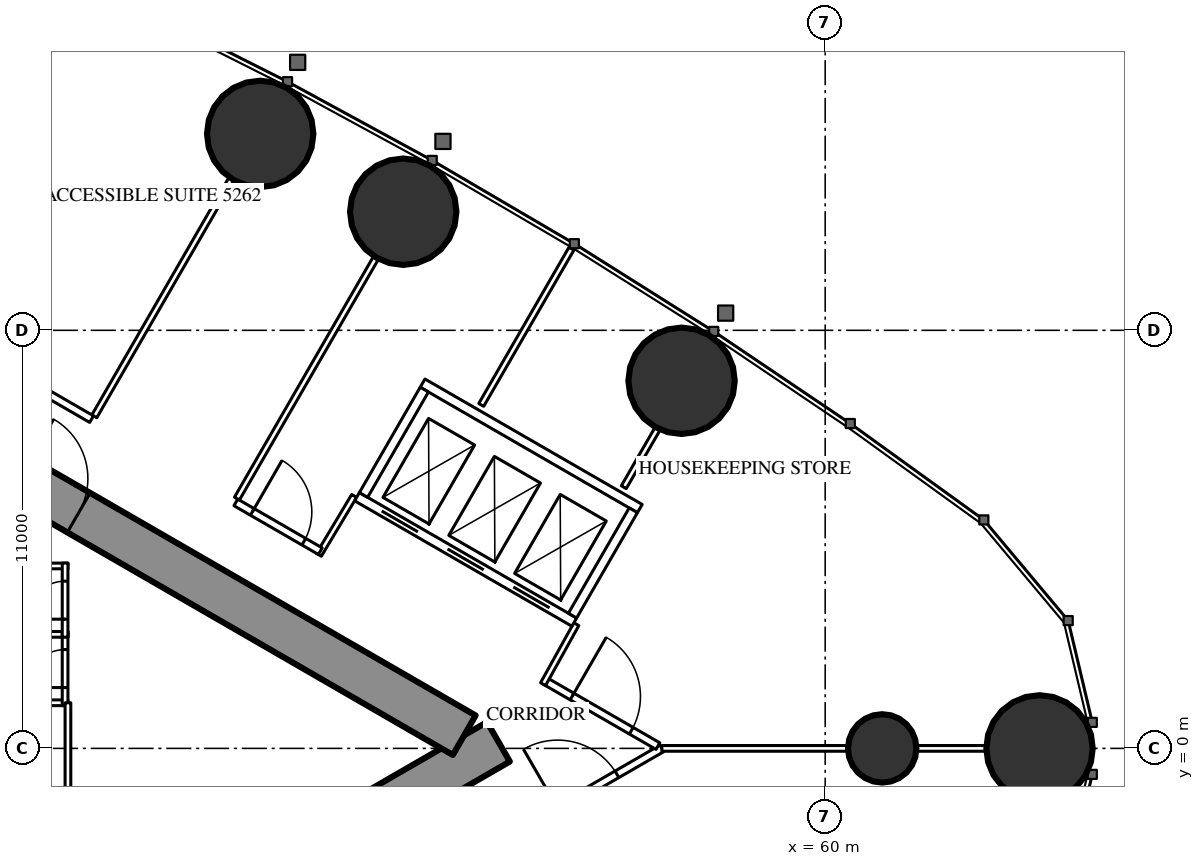
"""IFC4 building model, lengths in metres.
Left out: names, types, materials, properties, quantities, classifications, styles, units other than length and angle.
Written with IfcOpenShell. Run it as: python <this file> out.ifc"""

import sys

from ifc_helpers import new_model, si_unit, direction, frame, frame_2d, origin, origin_2d, place, context, subcontext, project, spatial, rectangle, circle, extrude, element, fill, save


model = new_model("IFC4")
c1 = context("Model", 3, precision=1e-05, world=origin(), true_north=direction((0.0, 1.0)))
c2 = subcontext(c1, "Body", "Model", "MODEL_VIEW")
j1 = project(units=[si_unit("LENGTHUNIT", "METRE"), si_unit("PLANEANGLEUNIT", "RADIAN")], contexts=[c1])
p1 = place(None, origin())
s1 = spatial("IfcSite", under=j1, at=p1, CompositionType="ELEMENT")
p2 = place(p1, origin())
s2 = spatial("IfcBuilding", under=s1, at=p2, CompositionType="ELEMENT")
p3 = place(p2, frame((0.0, 0.0, 194.8)))
s3 = spatial("IfcBuildingStorey", under=s2, at=p3, CompositionType="ELEMENT", Elevation=194.8)
for number, where, z_axis, x_axis in (
    (1, (65.64, 0.0, 0.0), (0.0, 0.0, 1.0), (1.0, 0.0, 0.0)),
    (2, (56.221, 9.672, 0.0), (0.0, 0.0, 1.0), (1.0, 0.0, 0.0)),
    (3, (48.897, 14.121, 0.0), (0.0, 0.0, 1.0), (1.0, 0.0, 0.0)),
    (4, (45.134, 16.168, 0.0), (0.0, 0.0, 1.0), (1.0, 0.0, 0.0)),
):
    element("IfcColumn", number, at=place(p3, frame(where, z_axis=z_axis, x_axis=x_axis)), inside=s3, PredefinedType="COLUMN", context=c2, shape_type="SweptSolid", body=[
        extrude(circle(Radius=1.4, at=origin_2d()), origin(), (0.0, 0.0, 1.0), 3.5),
    ])
p4 = place(p3, frame((61.5, 0.0, 0.0), z_axis=(0.0, 0.0, 1.0), x_axis=(1.0, 0.0, 0.0)))
e5 = element("IfcColumn", 5, at=p4, inside=s3, PredefinedType="COLUMN", context=c2, shape_type="SweptSolid", body=[
    extrude(circle(Radius=0.9, at=origin_2d()), origin(), (0.0, 0.0, 1.0), 3.5),
])
p5 = place(p3, frame((27.2, -13.8, 0.0), z_axis=(0.0, 0.0, 1.0), x_axis=(0.866027159892, 0.499996958321, 0.0)))
e6 = element("IfcWall", 6, at=p5, inside=s3, PredefinedType="SHEAR", context=c2, shape_type="SweptSolid", body=[
    extrude(rectangle(XDim=27.947, YDim=1.2, at=frame_2d((13.973, 0.0))), origin(), (0.0, 0.0, 1.0), 3.5),
])
p6 = place(p5, frame((4.6, 0.0, 0.0)))
e7 = element("IfcOpeningElement", 7, at=p6, cuts=e6, PredefinedType="OPENING", context=c2, shape_type="SweptSolid", body=[
    extrude(rectangle(XDim=1.0, YDim=2.2, at=frame_2d((0.5, 1.1))), frame((0.0, 0.61, 0.0), z_axis=(0.0, -1.0, 0.0), x_axis=(1.0, 0.0, 0.0)), (0.0, 0.0, 1.0), 1.22),
])
p7 = place(p5, frame((13.395, 0.0, 0.0)))
e8 = element("IfcOpeningElement", 8, at=p7, cuts=e6, PredefinedType="OPENING", context=c2, shape_type="SweptSolid", body=[
    extrude(rectangle(XDim=1.8, YDim=2.2, at=frame_2d((0.9, 1.1))), frame((0.0, 0.61, 0.0), z_axis=(0.0, -1.0, 0.0), x_axis=(1.0, 0.0, 0.0)), (0.0, 0.0, 1.0), 1.22),
])
p8 = place(p3, frame((27.2, 13.8, 0.0), z_axis=(0.0, 0.0, 1.0), x_axis=(0.866024515034, -0.500001539357, 0.0)))
e9 = element("IfcWall", 9, at=p8, inside=s3, PredefinedType="SHEAR", context=c2, shape_type="SweptSolid", body=[
    extrude(rectangle(XDim=26.907, YDim=1.2, at=frame_2d((13.454, 0.0))), origin(), (0.0, 0.0, 1.0), 3.5),
])
p9 = place(p8, frame((4.6, 0.0, 0.0)))
e10 = element("IfcOpeningElement", 10, at=p9, cuts=e9, PredefinedType="OPENING", context=c2, shape_type="SweptSolid", body=[
    extrude(rectangle(XDim=1.0, YDim=2.2, at=frame_2d((0.5, 1.1))), frame((0.0, 0.61, 0.0), z_axis=(0.0, -1.0, 0.0), x_axis=(1.0, 0.0, 0.0)), (0.0, 0.0, 1.0), 1.22),
])
p10 = place(p8, frame((13.395, 0.0, 0.0)))
e11 = element("IfcOpeningElement", 11, at=p10, cuts=e9, PredefinedType="OPENING", context=c2, shape_type="SweptSolid", body=[
    extrude(rectangle(XDim=1.8, YDim=2.2, at=frame_2d((0.9, 1.1))), frame((0.0, 0.61, 0.0), z_axis=(0.0, -1.0, 0.0), x_axis=(1.0, 0.0, 0.0)), (0.0, 0.0, 1.0), 1.22),
])
p11 = place(p3, frame((27.959, -16.017, 0.0), z_axis=(0.0, 0.0, 1.0), x_axis=(0.866024151371, 0.500002169237, 0.0)))
e12 = element("IfcWall", 12, at=p11, inside=s3, PredefinedType="PARTITIONING", context=c2, shape_type="SweptSolid", body=[
    extrude(rectangle(XDim=32.034, YDim=0.2, at=frame_2d((16.017, 0.0))), origin(), (0.0, 0.0, 1.0), 3.25),
])
p12 = place(p11, frame((0.6, 0.0, 0.0)))
e13 = element("IfcOpeningElement", 13, at=p12, cuts=e12, PredefinedType="OPENING", context=c2, shape_type="SweptSolid", body=[
    extrude(rectangle(XDim=0.95, YDim=2.2, at=frame_2d((0.475, 1.1))), frame((0.0, 0.11, 0.0), z_axis=(0.0, -1.0, 0.0), x_axis=(1.0, 0.0, 0.0)), (0.0, 0.0, 1.0), 0.22),
])
p13 = place(p11, frame((13.132, 0.0, 0.0)))
e14 = element("IfcOpeningElement", 14, at=p13, cuts=e12, PredefinedType="OPENING", context=c2, shape_type="SweptSolid", body=[
    extrude(rectangle(XDim=0.95, YDim=2.2, at=frame_2d((0.475, 1.1))), frame((0.0, 0.11, 0.0), z_axis=(0.0, -1.0, 0.0), x_axis=(1.0, 0.0, 0.0)), (0.0, 0.0, 1.0), 0.22),
])
p14 = place(p11, frame((15.391, 0.0, 0.0)))
e15 = element("IfcOpeningElement", 15, at=p14, cuts=e12, PredefinedType="OPENING", context=c2, shape_type="SweptSolid", body=[
    extrude(rectangle(XDim=0.95, YDim=2.2, at=frame_2d((0.475, 1.1))), frame((0.0, 0.11, 0.0), z_axis=(0.0, -1.0, 0.0), x_axis=(1.0, 0.0, 0.0)), (0.0, 0.0, 1.0), 0.22),
])
p15 = place(p11, frame((19.441, 0.0, 0.0)))
e16 = element("IfcOpeningElement", 16, at=p15, cuts=e12, PredefinedType="OPENING", context=c2, shape_type="SweptSolid", body=[
    extrude(rectangle(XDim=0.95, YDim=2.2, at=frame_2d((0.475, 1.1))), frame((0.0, 0.11, 0.0), z_axis=(0.0, -1.0, 0.0), x_axis=(1.0, 0.0, 0.0)), (0.0, 0.0, 1.0), 0.22),
])
p16 = place(p11, frame((26.406, 0.0, 0.0)))
e17 = element("IfcOpeningElement", 17, at=p16, cuts=e12, PredefinedType="OPENING", context=c2, shape_type="SweptSolid", body=[
    extrude(rectangle(XDim=0.95, YDim=2.2, at=frame_2d((0.475, 1.1))), frame((0.0, 0.11, 0.0), z_axis=(0.0, -1.0, 0.0), x_axis=(1.0, 0.0, 0.0)), (0.0, 0.0, 1.0), 0.22),
])
p17 = place(p11, frame((28.87, 0.0, 0.0)))
e18 = element("IfcOpeningElement", 18, at=p17, cuts=e12, PredefinedType="OPENING", context=c2, shape_type="SweptSolid", body=[
    extrude(rectangle(XDim=1.8, YDim=2.2, at=frame_2d((0.9, 1.1))), frame((0.0, 0.11, 0.0), z_axis=(0.0, -1.0, 0.0), x_axis=(1.0, 0.0, 0.0)), (0.0, 0.0, 1.0), 0.22),
])
p18 = place(p3, frame((40.769, 8.737, 0.0), z_axis=(0.0, 0.0, 1.0), x_axis=(0.500013115284, 0.866017831539, 0.0)))
e19 = element("IfcWall", 19, at=p18, inside=s3, PredefinedType="PARTITIONING", context=c2, shape_type="SweptSolid", body=[
    extrude(rectangle(XDim=7.198, YDim=0.15, at=frame_2d((3.599, 0.0))), origin(), (0.0, 0.0, 1.0), 2.3),
])
p19 = place(p3, frame((44.521, 6.571, 0.0), z_axis=(0.0, 0.0, 1.0), x_axis=(0.500020376429, 0.866013639128, 0.0)))
e20 = element("IfcWall", 20, at=p19, inside=s3, PredefinedType="PARTITIONING", context=c2, shape_type="SweptSolid", body=[
    extrude(rectangle(XDim=7.306, YDim=0.15, at=frame_2d((3.653, 0.0))), origin(), (0.0, 0.0, 1.0), 2.3),
])
p20 = place(p3, frame((55.702, 0.0, 0.0), z_axis=(0.0, 0.0, 1.0), x_axis=(1.0, 0.0, 0.0)))
e21 = element("IfcWall", 21, at=p20, inside=s3, PredefinedType="PARTITIONING", context=c2, shape_type="SweptSolid", body=[
    extrude(rectangle(XDim=8.518, YDim=0.15, at=frame_2d((4.259, 0.0))), origin(), (0.0, 0.0, 1.0), 2.3),
])
p21 = place(p3, frame((50.95, 9.037, 0.0), z_axis=(0.0, 0.0, 1.0), x_axis=(0.499988022762, 0.866032318735, 0.0)))
e22 = element("IfcWall", 22, at=p21, inside=s3, PredefinedType="PARTITIONING", context=c2, shape_type="SweptSolid", body=[
    extrude(rectangle(XDim=4.748, YDim=0.15, at=frame_2d((2.374, 0.0))), origin(), (0.0, 0.0, 1.0), 3.25),
])
p22 = place(p3, frame((54.7, 6.872, 0.0), z_axis=(0.0, 0.0, 1.0), x_axis=(0.499989690894, 0.866031355668, 0.0)))
e23 = element("IfcWall", 23, at=p22, inside=s3, PredefinedType="PARTITIONING", context=c2, shape_type="SweptSolid", body=[
    extrude(rectangle(XDim=1.766, YDim=0.15, at=frame_2d((0.883, 0.0))), origin(), (0.0, 0.0, 1.0), 3.25),
])
p23 = place(p3, frame((52.639, 1.769, 0.0), z_axis=(0.0, 0.0, 1.0), x_axis=(0.866027340901, -0.4999966448, 0.0)))
e24 = element("IfcWall", 24, at=p23, inside=s3, PredefinedType="PARTITIONING", context=c2, shape_type="SweptSolid", body=[
    extrude(rectangle(XDim=3.417, YDim=0.2, at=frame_2d((1.708, 0.0))), origin(), (0.0, 0.0, 1.0), 3.25),
])
p24 = place(p23, frame((0.809, 0.0, 0.0)))
e25 = element("IfcOpeningElement", 25, at=p24, cuts=e24, PredefinedType="OPENING", context=c2, shape_type="SweptSolid", body=[
    extrude(rectangle(XDim=1.8, YDim=2.2, at=frame_2d((0.9, 1.1))), frame((0.0, 0.11, 0.0), z_axis=(0.0, -1.0, 0.0), x_axis=(1.0, 0.0, 0.0)), (0.0, 0.0, 1.0), 0.22),
])
for number, where, z_axis, x_axis in (
    (26, (52.576, 1.689, 0.0), (0.0, 0.0, 1.0), (0.485, 0.874, 0.0)),
    (27, (47.606, 6.643, 0.0), (0.0, 0.0, 1.0), (-0.514, -0.858, 0.0)),
):
    element("IfcWall", number, at=place(p3, frame(where, z_axis=z_axis, x_axis=x_axis)), inside=s3, PredefinedType="PARTITIONING", context=c2, shape_type="SweptSolid", body=[
        extrude(rectangle(XDim=1.805, YDim=0.15, at=frame_2d((0.902, 0.0))), origin(), (0.0, 0.0, 1.0), 3.25),
    ])
p25 = place(p3, frame((27.959, 16.017, 0.0), z_axis=(0.0, 0.0, 1.0), x_axis=(0.866024165033, -0.500002145574, 0.0)))
e28 = element("IfcWall", 28, at=p25, inside=s3, PredefinedType="PARTITIONING", context=c2, shape_type="SweptSolid", body=[
    extrude(rectangle(XDim=14.709, YDim=0.2, at=frame_2d((7.354, 0.0))), origin(), (0.0, 0.0, 1.0), 3.25),
])
p26 = place(p25, frame((9.215, 0.0, 0.0)))
e29 = element("IfcOpeningElement", 29, at=p26, cuts=e28, PredefinedType="OPENING", context=c2, shape_type="SweptSolid", body=[
    extrude(rectangle(XDim=1.0, YDim=2.2, at=frame_2d((0.5, 1.1))), frame((0.0, 0.11, 0.0), z_axis=(0.0, -1.0, 0.0), x_axis=(1.0, 0.0, 0.0)), (0.0, 0.0, 1.0), 0.22),
])
p27 = place(p25, frame((4.765, 0.0, 0.0)))
e30 = element("IfcOpeningElement", 30, at=p27, cuts=e28, PredefinedType="OPENING", context=c2, shape_type="SweptSolid", body=[
    extrude(rectangle(XDim=0.95, YDim=2.2, at=frame_2d((0.475, 1.1))), frame((0.0, 0.11, 0.0), z_axis=(0.0, -1.0, 0.0), x_axis=(1.0, 0.0, 0.0)), (0.0, 0.0, 1.0), 0.22),
])
p28 = place(p3, frame((44.493, 6.472, 0.0), z_axis=(0.0, 0.0, 1.0), x_axis=(0.866027140358, -0.499996992154, 0.0)))
e31 = element("IfcWall", 31, at=p28, inside=s3, PredefinedType="PARTITIONING", context=c2, shape_type="SweptSolid", body=[
    extrude(rectangle(XDim=2.566, YDim=0.2, at=frame_2d((1.283, 0.0))), origin(), (0.0, 0.0, 1.0), 3.25),
])
p29 = place(p28, frame((0.5, 0.0, 0.0)))
e32 = element("IfcOpeningElement", 32, at=p29, cuts=e31, PredefinedType="OPENING", context=c2, shape_type="SweptSolid", body=[
    extrude(rectangle(XDim=1.566, YDim=2.2, at=frame_2d((0.783, 1.1))), frame((0.0, 0.11, 0.0), z_axis=(0.0, -1.0, 0.0), x_axis=(1.0, 0.0, 0.0)), (0.0, 0.0, 1.0), 0.22),
])
for number, where, z_axis, x_axis in (
    (33, (37.9, 1.2, 0.0), (0.0, 0.0, 1.0), (1.0, 0.0, 0.0)),
    (34, (37.9, 3.0, 0.0), (0.0, 0.0, 1.0), (1.0, 0.0, 0.0)),
    (35, (37.9, 4.8, 0.0), (0.0, 0.0, 1.0), (1.0, 0.0, 0.0)),
):
    element("IfcWall", number, at=place(p3, frame(where, z_axis=z_axis, x_axis=x_axis)), inside=s3, PredefinedType="PARTITIONING", context=c2, shape_type="SweptSolid", body=[
        extrude(rectangle(XDim=2.175, YDim=0.15, at=frame_2d((1.087, 0.0))), origin(), (0.0, 0.0, 1.0), 3.25),
    ])
p30 = place(p3, frame((40.0, 1.125, 0.0), z_axis=(0.0, 0.0, 1.0), x_axis=(0.0, 1.0, 0.0)))
e36 = element("IfcWall", 36, at=p30, inside=s3, PredefinedType="PARTITIONING", context=c2, shape_type="SweptSolid", body=[
    extrude(rectangle(XDim=1.95, YDim=0.15, at=frame_2d((0.975, 0.0))), origin(), (0.0, 0.0, 1.0), 3.25),
])
p31 = place(p30, frame((0.475, 0.0, 0.0)))
e37 = element("IfcOpeningElement", 37, at=p31, cuts=e36, PredefinedType="OPENING", context=c2, shape_type="SweptSolid", body=[
    extrude(rectangle(XDim=1.0, YDim=2.2, at=frame_2d((0.5, 1.1))), frame((0.0, 0.085, 0.0), z_axis=(0.0, -1.0, 0.0), x_axis=(1.0, 0.0, 0.0)), (0.0, 0.0, 1.0), 0.17),
])
p32 = place(p3, frame((40.0, 2.925, 0.0), z_axis=(0.0, 0.0, 1.0), x_axis=(0.0, 1.0, 0.0)))
e38 = element("IfcWall", 38, at=p32, inside=s3, PredefinedType="PARTITIONING", context=c2, shape_type="SweptSolid", body=[
    extrude(rectangle(XDim=1.95, YDim=0.15, at=frame_2d((0.975, 0.0))), origin(), (0.0, 0.0, 1.0), 3.25),
])
p33 = place(p32, frame((0.475, 0.0, 0.0)))
e39 = element("IfcOpeningElement", 39, at=p33, cuts=e38, PredefinedType="OPENING", context=c2, shape_type="SweptSolid", body=[
    extrude(rectangle(XDim=1.0, YDim=2.2, at=frame_2d((0.5, 1.1))), frame((0.0, 0.085, 0.0), z_axis=(0.0, -1.0, 0.0), x_axis=(1.0, 0.0, 0.0)), (0.0, 0.0, 1.0), 0.17),
])
p34 = place(p3, frame((40.075, -5.674, 0.0), z_axis=(0.0, 0.0, 1.0), x_axis=(0.0, 1.0, 0.0)))
e40 = element("IfcWall", 40, at=p34, inside=s3, PredefinedType="PARTITIONING", context=c2, shape_type="SweptSolid", body=[
    extrude(rectangle(XDim=6.874, YDim=0.15, at=frame_2d((3.437, 0.0))), origin(), (0.0, 0.0, 1.0), 3.25),
])
p35 = place(p34, frame((2.537, 0.0, 0.0)))
e41 = element("IfcOpeningElement", 41, at=p35, cuts=e40, PredefinedType="OPENING", context=c2, shape_type="SweptSolid", body=[
    extrude(rectangle(XDim=1.8, YDim=2.2, at=frame_2d((0.9, 1.1))), frame((0.0, 0.085, 0.0), z_axis=(0.0, -1.0, 0.0), x_axis=(1.0, 0.0, 0.0)), (0.0, 0.0, 1.0), 0.17),
])
p36 = place(p3, frame((47.681, 6.622, 0.0), z_axis=(0.0, 0.0, 1.0), x_axis=(0.86603344179, -0.499986077507, 0.0)))
e42 = element("IfcWall", 42, at=p36, inside=s3, PredefinedType="PARTITIONING", context=c2, shape_type="SweptSolid", body=[
    extrude(rectangle(XDim=6.6, YDim=0.25, at=frame_2d((3.3, 0.0))), origin(), (0.0, 0.0, 1.0), 3.25),
])
p37 = place(p36, frame((0.75, 0.0, 0.0)))
e43 = element("IfcOpeningElement", 43, at=p37, cuts=e42, PredefinedType="OPENING", context=c2, shape_type="SweptSolid", body=[
    extrude(rectangle(XDim=1.1, YDim=2.2, at=frame_2d((0.55, 1.1))), frame((0.0, 0.135, 0.0), z_axis=(0.0, -1.0, 0.0), x_axis=(1.0, 0.0, 0.0)), (0.0, 0.0, 1.0), 0.27),
])
p38 = place(p36, frame((2.75, 0.0, 0.0)))
e44 = element("IfcOpeningElement", 44, at=p38, cuts=e42, PredefinedType="OPENING", context=c2, shape_type="SweptSolid", body=[
    extrude(rectangle(XDim=1.1, YDim=2.2, at=frame_2d((0.55, 1.1))), frame((0.0, 0.135, 0.0), z_axis=(0.0, -1.0, 0.0), x_axis=(1.0, 0.0, 0.0)), (0.0, 0.0, 1.0), 0.27),
])
p39 = place(p36, frame((4.75, 0.0, 0.0)))
e45 = element("IfcOpeningElement", 45, at=p39, cuts=e42, PredefinedType="OPENING", context=c2, shape_type="SweptSolid", body=[
    extrude(rectangle(XDim=1.1, YDim=2.2, at=frame_2d((0.55, 1.1))), frame((0.0, 0.135, 0.0), z_axis=(0.0, -1.0, 0.0), x_axis=(1.0, 0.0, 0.0)), (0.0, 0.0, 1.0), 0.27),
])
p40 = place(p3, frame((49.406, 9.611, 0.0), z_axis=(0.0, 0.0, 1.0), x_axis=(0.86603344179, -0.499986077507, 0.0)))
e46 = element("IfcWall", 46, at=p40, inside=s3, PredefinedType="PARTITIONING", context=c2, shape_type="SweptSolid", body=[
    extrude(rectangle(XDim=6.6, YDim=0.25, at=frame_2d((3.3, 0.0))), origin(), (0.0, 0.0, 1.0), 3.25),
])
p41 = place(p3, frame((47.852, 6.668, 0.0), z_axis=(0.0, 0.0, 1.0), x_axis=(0.499929347863, 0.866066190972, 0.0)))
e47 = element("IfcWall", 47, at=p41, inside=s3, PredefinedType="PARTITIONING", context=c2, shape_type="SweptSolid", body=[
    extrude(rectangle(XDim=3.201, YDim=0.25, at=frame_2d((1.6, 0.0))), origin(), (0.0, 0.0, 1.0), 3.25),
])
p42 = place(p3, frame((53.352, 3.493, 0.0), z_axis=(0.0, 0.0, 1.0), x_axis=(0.499872130319, 0.866099216793, 0.0)))
e48 = element("IfcWall", 48, at=p42, inside=s3, PredefinedType="PARTITIONING", context=c2, shape_type="SweptSolid", body=[
    extrude(rectangle(XDim=3.2, YDim=0.25, at=frame_2d((1.6, 0.0))), origin(), (0.0, 0.0, 1.0), 3.25),
])
p43 = place(p17, origin())
e49 = element("IfcDoor", 49, at=p43, inside=s3, OperationType="DOUBLE_DOOR_SINGLE_SWING", PredefinedType="DOOR", context=c2, shape_type="SweptSolid", body=[
    extrude(rectangle(XDim=1.8, YDim=2.2, at=frame_2d((0.9, 1.1))), frame((0.0, 0.025, 0.0), z_axis=(0.0, -1.0, 0.0), x_axis=(1.0, 0.0, 0.0)), (0.0, 0.0, 1.0), 0.05),
])
fill(e18, e49)
p44 = place(p24, origin())
e50 = element("IfcDoor", 50, at=p44, inside=s3, OperationType="DOUBLE_DOOR_SINGLE_SWING", PredefinedType="DOOR", context=c2, shape_type="SweptSolid", body=[
    extrude(rectangle(XDim=1.8, YDim=2.2, at=frame_2d((0.9, 1.1))), frame((0.0, 0.025, 0.0), z_axis=(0.0, -1.0, 0.0), x_axis=(1.0, 0.0, 0.0)), (0.0, 0.0, 1.0), 0.05),
])
fill(e25, e50)
p45 = place(p29, origin())
e51 = element("IfcDoor", 51, at=p45, inside=s3, OperationType="SINGLE_SWING_LEFT", PredefinedType="DOOR", context=c2, shape_type="SweptSolid", body=[
    extrude(rectangle(XDim=1.566, YDim=2.2, at=frame_2d((0.783, 1.1))), frame((0.0, 0.025, 0.0), z_axis=(0.0, -1.0, 0.0), x_axis=(1.0, 0.0, 0.0)), (0.0, 0.0, 1.0), 0.05),
])
fill(e32, e51)
p46 = place(p31, origin())
e52 = element("IfcDoor", 52, at=p46, inside=s3, OperationType="SINGLE_SWING_LEFT", PredefinedType="DOOR", context=c2, shape_type="SweptSolid", body=[
    extrude(rectangle(XDim=1.0, YDim=2.2, at=frame_2d((0.5, 1.1))), frame((0.0, 0.025, 0.0), z_axis=(0.0, -1.0, 0.0), x_axis=(1.0, 0.0, 0.0)), (0.0, 0.0, 1.0), 0.05),
])
fill(e37, e52)
p47 = place(p33, origin())
e53 = element("IfcDoor", 53, at=p47, inside=s3, OperationType="SINGLE_SWING_LEFT", PredefinedType="DOOR", context=c2, shape_type="SweptSolid", body=[
    extrude(rectangle(XDim=1.0, YDim=2.2, at=frame_2d((0.5, 1.1))), frame((0.0, 0.025, 0.0), z_axis=(0.0, -1.0, 0.0), x_axis=(1.0, 0.0, 0.0)), (0.0, 0.0, 1.0), 0.05),
])
fill(e39, e53)
p48 = place(p10, origin())
e54 = element("IfcDoor", 54, at=p48, inside=s3, OperationType="DOUBLE_DOOR_SINGLE_SWING", PredefinedType="DOOR", context=c2, shape_type="SweptSolid", body=[
    extrude(rectangle(XDim=1.8, YDim=2.2, at=frame_2d((0.9, 1.1))), frame((0.0, 0.025, 0.0), z_axis=(0.0, -1.0, 0.0), x_axis=(1.0, 0.0, 0.0)), (0.0, 0.0, 1.0), 0.05),
])
fill(e11, e54)
p49 = place(p37, origin())
e55 = element("IfcDoor", 55, at=p49, inside=s3, OperationType="DOUBLE_DOOR_SLIDING", PredefinedType="USERDEFINED", context=c2, shape_type="SweptSolid", body=[
    extrude(rectangle(XDim=1.1, YDim=2.2, at=frame_2d((0.55, 1.1))), frame((0.0, 0.025, 0.0), z_axis=(0.0, -1.0, 0.0), x_axis=(1.0, 0.0, 0.0)), (0.0, 0.0, 1.0), 0.05),
])
fill(e43, e55)
p50 = place(p38, origin())
e56 = element("IfcDoor", 56, at=p50, inside=s3, OperationType="DOUBLE_DOOR_SLIDING", PredefinedType="USERDEFINED", context=c2, shape_type="SweptSolid", body=[
    extrude(rectangle(XDim=1.1, YDim=2.2, at=frame_2d((0.55, 1.1))), frame((0.0, 0.025, 0.0), z_axis=(0.0, -1.0, 0.0), x_axis=(1.0, 0.0, 0.0)), (0.0, 0.0, 1.0), 0.05),
])
fill(e44, e56)
p51 = place(p39, origin())
e57 = element("IfcDoor", 57, at=p51, inside=s3, OperationType="DOUBLE_DOOR_SLIDING", PredefinedType="USERDEFINED", context=c2, shape_type="SweptSolid", body=[
    extrude(rectangle(XDim=1.1, YDim=2.2, at=frame_2d((0.55, 1.1))), frame((0.0, 0.025, 0.0), z_axis=(0.0, -1.0, 0.0), x_axis=(1.0, 0.0, 0.0)), (0.0, 0.0, 1.0), 0.05),
])
fill(e45, e57)
save(model, sys.argv[1])
